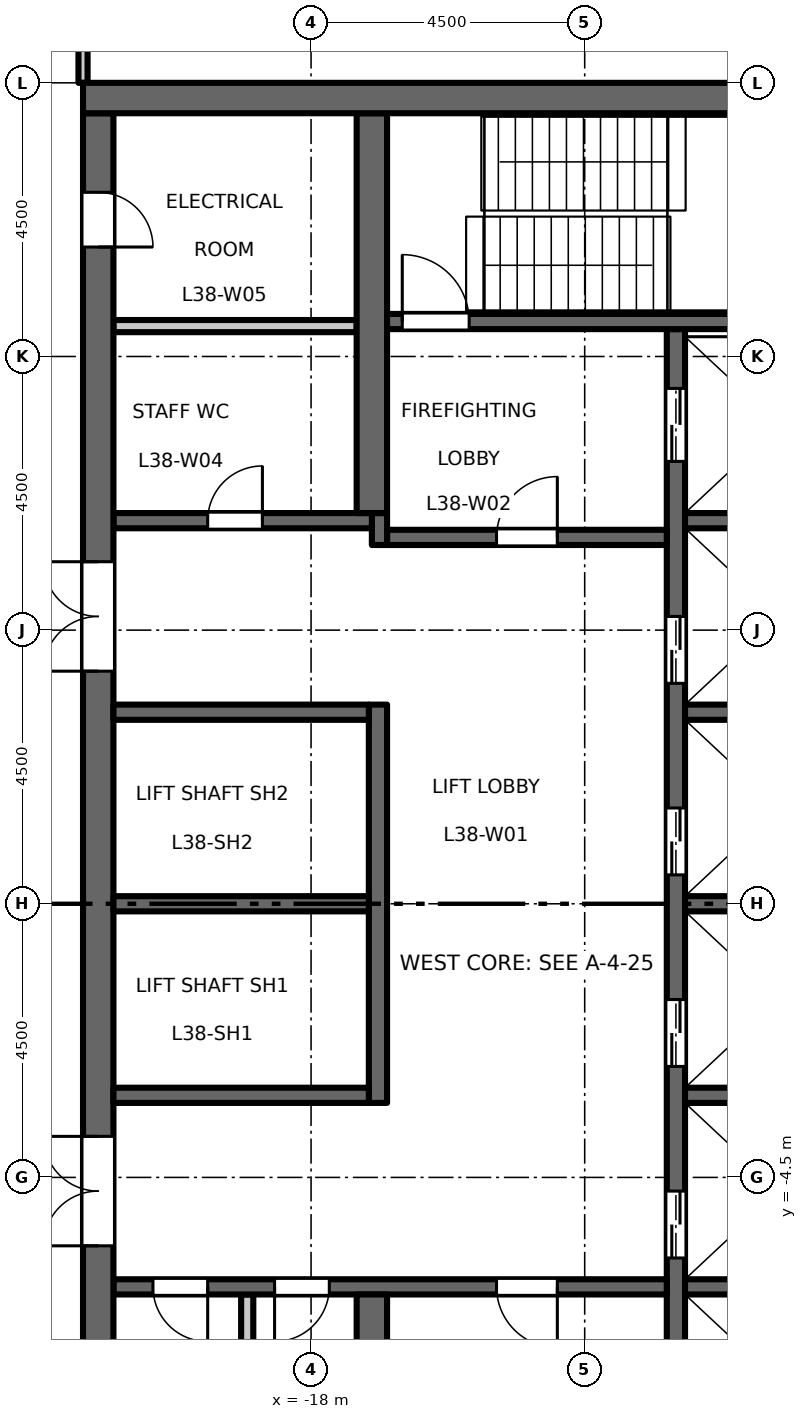
"""IFC4 building model, lengths in metres.
Left out: names, types, materials, properties, quantities, classifications, styles, units other than length and angle.
Written with IfcOpenShell. Run it as: python <this file> out.ifc"""

import sys

from ifc_helpers import new_model, si_unit, direction, frame, frame_2d, origin, place, context, subcontext, project, spatial, rectangle, extrude, element, fill, save


model = new_model("IFC4")
c1 = context("Model", 3, precision=1e-05, world=origin(), true_north=direction((0.0, 1.0)))
c2 = subcontext(c1, "Body", "Model", "MODEL_VIEW")
j1 = project(units=[si_unit("LENGTHUNIT", "METRE"), si_unit("PLANEANGLEUNIT", "RADIAN")], contexts=[c1])
p1 = place(None, origin())
s1 = spatial("IfcSite", under=j1, at=p1, CompositionType="ELEMENT")
p2 = place(p1, origin())
s2 = spatial("IfcBuilding", under=s1, at=p2, CompositionType="ELEMENT")
p3 = place(p2, frame((0.0, 0.0, 176.7)))
s3 = spatial("IfcBuildingStorey", under=s2, at=p3, CompositionType="ELEMENT", Elevation=176.7)
p4 = place(p3, frame((-12.0, -9.45, 0.0), z_axis=(0.0, 0.0, 1.0), x_axis=(0.0, 1.0, 0.0)))
e1 = element("IfcWall", 1, at=p4, inside=s3, PredefinedType="SHEAR", context=c2, shape_type="SweptSolid", body=[
    extrude(rectangle(XDim=18.9, YDim=0.3, at=frame_2d((9.45, 0.0))), origin(), (0.0, 0.0, 1.0), 4.3),
])
p5 = place(p4, frame((3.625, 0.0, 0.0)))
e2 = element("IfcOpeningElement", 2, at=p5, cuts=e1, PredefinedType="OPENING", context=c2, shape_type="SweptSolid", body=[
    extrude(rectangle(XDim=1.1, YDim=2.1, at=frame_2d((0.55, 1.05))), frame((0.0, 0.16, 0.0), z_axis=(0.0, -1.0, 0.0), x_axis=(1.0, 0.0, 0.0)), (0.0, 0.0, 1.0), 0.32),
])
p6 = place(p4, frame((6.775, 0.0, 0.0)))
e3 = element("IfcOpeningElement", 3, at=p6, cuts=e1, PredefinedType="OPENING", context=c2, shape_type="SweptSolid", body=[
    extrude(rectangle(XDim=1.1, YDim=2.1, at=frame_2d((0.55, 1.05))), frame((0.0, 0.16, 0.0), z_axis=(0.0, -1.0, 0.0), x_axis=(1.0, 0.0, 0.0)), (0.0, 0.0, 1.0), 0.32),
])
p7 = place(p4, frame((9.925, 0.0, 0.0)))
e4 = element("IfcOpeningElement", 4, at=p7, cuts=e1, PredefinedType="OPENING", context=c2, shape_type="SweptSolid", body=[
    extrude(rectangle(XDim=1.1, YDim=2.1, at=frame_2d((0.55, 1.05))), frame((0.0, 0.16, 0.0), z_axis=(0.0, -1.0, 0.0), x_axis=(1.0, 0.0, 0.0)), (0.0, 0.0, 1.0), 0.32),
])
p8 = place(p4, frame((13.075, 0.0, 0.0)))
e5 = element("IfcOpeningElement", 5, at=p8, cuts=e1, PredefinedType="OPENING", context=c2, shape_type="SweptSolid", body=[
    extrude(rectangle(XDim=1.1, YDim=2.1, at=frame_2d((0.55, 1.05))), frame((0.0, 0.16, 0.0), z_axis=(0.0, -1.0, 0.0), x_axis=(1.0, 0.0, 0.0)), (0.0, 0.0, 1.0), 0.32),
])
p9 = place(p4, frame((16.725, 0.0, 0.0)))
e6 = element("IfcOpeningElement", 6, at=p9, cuts=e1, PredefinedType="OPENING", context=c2, shape_type="SweptSolid", body=[
    extrude(rectangle(XDim=1.2, YDim=2.1, at=frame_2d((0.6, 1.05))), frame((0.0, 0.16, 0.0), z_axis=(0.0, -1.0, 0.0), x_axis=(1.0, 0.0, 0.0)), (0.0, 0.0, 1.0), 0.32),
])
p10 = place(p4, frame((0.975, 0.0, 0.0)))
e7 = element("IfcOpeningElement", 7, at=p10, cuts=e1, PredefinedType="OPENING", context=c2, shape_type="SweptSolid", body=[
    extrude(rectangle(XDim=1.2, YDim=2.1, at=frame_2d((0.6, 1.05))), frame((0.0, 0.16, 0.0), z_axis=(0.0, -1.0, 0.0), x_axis=(1.0, 0.0, 0.0)), (0.0, 0.0, 1.0), 0.32),
])
p11 = place(p3, frame((-12.15, 6.025, 0.0), z_axis=(0.0, 0.0, 1.0), x_axis=(-1.0, 0.0, 0.0)))
e8 = element("IfcWall", 8, at=p11, inside=s3, PredefinedType="SHEAR", context=c2, shape_type="SweptSolid", body=[
    extrude(rectangle(XDim=4.6, YDim=0.25, at=frame_2d((2.3, 0.0))), origin(), (0.0, 0.0, 1.0), 4.3),
])
p12 = place(p11, frame((1.8, 0.0, 0.0)))
e9 = element("IfcOpeningElement", 9, at=p12, cuts=e8, PredefinedType="OPENING", context=c2, shape_type="SweptSolid", body=[
    extrude(rectangle(XDim=1.0, YDim=2.1, at=frame_2d((0.5, 1.05))), frame((0.0, 0.135, 0.0), z_axis=(0.0, -1.0, 0.0), x_axis=(1.0, 0.0, 0.0)), (0.0, 0.0, 1.0), 0.27),
])
p13 = place(p3, frame((-16.875, 5.9, 0.0), z_axis=(0.0, 0.0, 1.0), x_axis=(0.0, 1.0, 0.0)))
e10 = element("IfcWall", 10, at=p13, inside=s3, PredefinedType="SHEAR", context=c2, shape_type="SweptSolid", body=[
    extrude(rectangle(XDim=0.525, YDim=0.25, at=frame_2d((0.263, 0.0))), origin(), (0.0, 0.0, 1.0), 4.3),
])
p14 = place(p3, frame((-17.0, 6.3, 0.0), z_axis=(0.0, 0.0, 1.0), x_axis=(-1.0, 0.0, 0.0)))
e11 = element("IfcWall", 11, at=p14, inside=s3, PredefinedType="SHEAR", context=c2, shape_type="SweptSolid", body=[
    extrude(rectangle(XDim=4.25, YDim=0.25, at=frame_2d((2.125, 0.0))), origin(), (0.0, 0.0, 1.0), 4.3),
])
p15 = place(p14, frame((1.8, 0.0, 0.0)))
e12 = element("IfcOpeningElement", 12, at=p15, cuts=e11, PredefinedType="OPENING", context=c2, shape_type="SweptSolid", body=[
    extrude(rectangle(XDim=0.9, YDim=2.1, at=frame_2d((0.45, 1.05))), frame((0.0, 0.135, 0.0), z_axis=(0.0, -1.0, 0.0), x_axis=(1.0, 0.0, 0.0)), (0.0, 0.0, 1.0), 0.27),
])
p16 = place(p3, frame((-12.15, -6.3, 0.0), z_axis=(0.0, 0.0, 1.0), x_axis=(-1.0, 0.0, 0.0)))
e13 = element("IfcWall", 13, at=p16, inside=s3, PredefinedType="SHEAR", context=c2, shape_type="SweptSolid", body=[
    extrude(rectangle(XDim=9.1, YDim=0.25, at=frame_2d((4.55, 0.0))), origin(), (0.0, 0.0, 1.0), 4.3),
])
p17 = place(p16, frame((1.8, 0.0, 0.0)))
e14 = element("IfcOpeningElement", 14, at=p17, cuts=e13, PredefinedType="OPENING", context=c2, shape_type="SweptSolid", body=[
    extrude(rectangle(XDim=1.0, YDim=2.1, at=frame_2d((0.5, 1.05))), frame((0.0, 0.135, 0.0), z_axis=(0.0, -1.0, 0.0), x_axis=(1.0, 0.0, 0.0)), (0.0, 0.0, 1.0), 0.27),
])
p18 = place(p16, frame((5.55, 0.0, 0.0)))
e15 = element("IfcOpeningElement", 15, at=p18, cuts=e13, PredefinedType="OPENING", context=c2, shape_type="SweptSolid", body=[
    extrude(rectangle(XDim=0.9, YDim=2.1, at=frame_2d((0.45, 1.05))), frame((0.0, 0.135, 0.0), z_axis=(0.0, -1.0, 0.0), x_axis=(1.0, 0.0, 0.0)), (0.0, 0.0, 1.0), 0.27),
])
p19 = place(p16, frame((7.55, 0.0, 0.0)))
e16 = element("IfcOpeningElement", 16, at=p19, cuts=e13, PredefinedType="OPENING", context=c2, shape_type="SweptSolid", body=[
    extrude(rectangle(XDim=0.9, YDim=2.1, at=frame_2d((0.45, 1.05))), frame((0.0, 0.135, 0.0), z_axis=(0.0, -1.0, 0.0), x_axis=(1.0, 0.0, 0.0)), (0.0, 0.0, 1.0), 0.27),
])
p20 = place(p3, frame((-21.5, -13.0, 0.0), z_axis=(0.0, 0.0, 1.0), x_axis=(0.0, 1.0, 0.0)))
e17 = element("IfcWall", 17, at=p20, inside=s3, PredefinedType="SHEAR", context=c2, shape_type="SweptSolid", body=[
    extrude(rectangle(XDim=26.0, YDim=0.5, at=frame_2d((13.0, 0.0))), origin(), (0.0, 0.0, 1.0), 4.3),
])
p21 = place(p20, frame((16.825, 0.0, 0.0)))
e18 = element("IfcOpeningElement", 18, at=p21, cuts=e17, PredefinedType="OPENING", context=c2, shape_type="SweptSolid", body=[
    extrude(rectangle(XDim=1.8, YDim=2.1, at=frame_2d((0.9, 1.05))), frame((0.0, 0.26, 0.0), z_axis=(0.0, -1.0, 0.0), x_axis=(1.0, 0.0, 0.0)), (0.0, 0.0, 1.0), 0.52),
])
p22 = place(p20, frame((7.375, 0.0, 0.0)))
e19 = element("IfcOpeningElement", 19, at=p22, cuts=e17, PredefinedType="OPENING", context=c2, shape_type="SweptSolid", body=[
    extrude(rectangle(XDim=1.8, YDim=2.1, at=frame_2d((0.9, 1.05))), frame((0.0, 0.26, 0.0), z_axis=(0.0, -1.0, 0.0), x_axis=(1.0, 0.0, 0.0)), (0.0, 0.0, 1.0), 0.52),
])
p23 = place(p20, frame((23.8, 0.0, 0.0)))
e20 = element("IfcOpeningElement", 20, at=p23, cuts=e17, PredefinedType="OPENING", context=c2, shape_type="SweptSolid", body=[
    extrude(rectangle(XDim=0.9, YDim=2.1, at=frame_2d((0.45, 1.05))), frame((0.0, 0.26, 0.0), z_axis=(0.0, -1.0, 0.0), x_axis=(1.0, 0.0, 0.0)), (0.0, 0.0, 1.0), 0.52),
])
p24 = place(p3, frame((-17.25, 9.5, 0.0), z_axis=(0.0, 0.0, 1.0), x_axis=(-1.0, 0.0, 0.0)))
e21 = element("IfcWall", 21, at=p24, inside=s3, PredefinedType="PARTITIONING", context=c2, shape_type="SweptSolid", body=[
    extrude(rectangle(XDim=4.0, YDim=0.2, at=frame_2d((2.0, 0.0))), origin(), (0.0, 0.0, 1.0), 4.3),
])
p25 = place(p3, frame((-19.05, -13.0, 0.0), z_axis=(0.0, 0.0, 1.0), x_axis=(0.0, 1.0, 0.0)))
e22 = element("IfcWall", 22, at=p25, inside=s3, PredefinedType="PARTITIONING", context=c2, shape_type="SweptSolid", body=[
    extrude(rectangle(XDim=6.575, YDim=0.2, at=frame_2d((3.288, 0.0))), origin(), (0.0, 0.0, 1.0), 4.3),
])
p26 = place(p3, frame((-16.9, -3.275, 0.0), z_axis=(0.0, 0.0, 1.0), x_axis=(0.0, 1.0, 0.0)))
e23 = element("IfcWall", 23, at=p26, inside=s3, PredefinedType="SHEAR", context=c2, shape_type="SweptSolid", body=[
    extrude(rectangle(XDim=6.55, YDim=0.3, at=frame_2d((3.275, 0.0))), origin(), (0.0, 0.0, 1.0), 4.3),
])
for number, where, z_axis, x_axis in (
    (24, (-17.05, 0.0, 0.0), (0.0, 0.0, 1.0), (-1.0, 0.0, 0.0)),
    (25, (-17.05, 3.15, 0.0), (0.0, 0.0, 1.0), (-1.0, 0.0, 0.0)),
    (26, (-17.05, -3.15, 0.0), (0.0, 0.0, 1.0), (-1.0, 0.0, 0.0)),
):
    element("IfcWall", number, at=place(p3, frame(where, z_axis=z_axis, x_axis=x_axis)), inside=s3, PredefinedType="SHEAR", context=c2, shape_type="SweptSolid", body=[
        extrude(rectangle(XDim=4.2, YDim=0.25, at=frame_2d((2.1, 0.0))), origin(), (0.0, 0.0, 1.0), 4.3),
    ])
for number, where, z_axis, x_axis in (
    (27, (-17.0, 6.425, 0.0), (0.0, 0.0, 1.0), (0.0, 1.0, 0.0)),
    (28, (-17.0, -13.0, 0.0), (0.0, 0.0, 1.0), (0.0, 1.0, 0.0)),
):
    element("IfcWall", number, at=place(p3, frame(where, z_axis=z_axis, x_axis=x_axis)), inside=s3, PredefinedType="SHEAR", context=c2, shape_type="SweptSolid", body=[
        extrude(rectangle(XDim=6.575, YDim=0.5, at=frame_2d((3.288, 0.0))), origin(), (0.0, 0.0, 1.0), 4.3),
    ])
for number, where, z_axis, x_axis in (
    (29, (-8.75, 0.0, 0.0), (0.0, 0.0, 1.0), (-1.0, 0.0, 0.0)),
    (30, (-8.75, 3.15, 0.0), (0.0, 0.0, 1.0), (-1.0, 0.0, 0.0)),
    (31, (-8.75, 6.3, 0.0), (0.0, 0.0, 1.0), (-1.0, 0.0, 0.0)),
    (32, (-8.75, -3.15, 0.0), (0.0, 0.0, 1.0), (-1.0, 0.0, 0.0)),
    (33, (-8.75, -6.3, 0.0), (0.0, 0.0, 1.0), (-1.0, 0.0, 0.0)),
):
    element("IfcWall", number, at=place(p3, frame(where, z_axis=z_axis, x_axis=x_axis)), inside=s3, PredefinedType="SHEAR", context=c2, shape_type="SweptSolid", body=[
        extrude(rectangle(XDim=3.1, YDim=0.25, at=frame_2d((1.55, 0.0))), origin(), (0.0, 0.0, 1.0), 4.3),
    ])
p27 = place(p3, frame((-8.75, 9.575, 0.0), z_axis=(0.0, 0.0, 1.0), x_axis=(-1.0, 0.0, 0.0)))
e34 = element("IfcWall", 34, at=p27, inside=s3, PredefinedType="SHEAR", context=c2, shape_type="SweptSolid", body=[
    extrude(rectangle(XDim=8.0, YDim=0.25, at=frame_2d((4.0, 0.0))), origin(), (0.0, 0.0, 1.0), 4.3),
])
p28 = place(p27, frame((6.65, 0.0, 0.0)))
e35 = element("IfcOpeningElement", 35, at=p28, cuts=e34, PredefinedType="OPENING", context=c2, shape_type="SweptSolid", body=[
    extrude(rectangle(XDim=1.1, YDim=2.1, at=frame_2d((0.55, 1.05))), frame((0.0, 0.135, 0.0), z_axis=(0.0, -1.0, 0.0), x_axis=(1.0, 0.0, 0.0)), (0.0, 0.0, 1.0), 0.27),
])
p29 = place(p3, frame((-8.25, 13.25, 0.0), z_axis=(0.0, 0.0, 1.0), x_axis=(-1.0, 0.0, 0.0)))
e36 = element("IfcWall", 36, at=p29, inside=s3, PredefinedType="SHEAR", context=c2, shape_type="SweptSolid", body=[
    extrude(rectangle(XDim=13.5, YDim=0.5, at=frame_2d((6.75, 0.0))), origin(), (0.0, 0.0, 1.0), 4.3),
])
p30 = place(p3, frame((-21.75, 13.5, 0.0), z_axis=(0.0, 0.0, 1.0), x_axis=(0.0, 1.0, 0.0)))
e37 = element("IfcWall", 37, at=p30, inside=s3, PredefinedType="PARTITIONING", context=c2, shape_type="SweptSolid", body=[
    extrude(rectangle(XDim=5.425, YDim=0.15, at=frame_2d((2.712, 0.0))), origin(), (0.0, 0.0, 1.0), 4.3),
])
p31 = place(p12, origin())
e38 = element("IfcDoor", 38, at=p31, inside=s3, OperationType="SINGLE_SWING_LEFT", PredefinedType="DOOR", context=c2, shape_type="SweptSolid", body=[
    extrude(rectangle(XDim=1.0, YDim=2.1, at=frame_2d((0.5, 1.05))), frame((0.0, 0.025, 0.0), z_axis=(0.0, -1.0, 0.0), x_axis=(1.0, 0.0, 0.0)), (0.0, 0.0, 1.0), 0.05),
])
fill(e9, e38)
p32 = place(p17, origin())
e39 = element("IfcDoor", 39, at=p32, inside=s3, OperationType="SINGLE_SWING_RIGHT", PredefinedType="DOOR", context=c2, shape_type="SweptSolid", body=[
    extrude(rectangle(XDim=1.0, YDim=2.1, at=frame_2d((0.5, 1.05))), frame((0.0, 0.025, 0.0), z_axis=(0.0, -1.0, 0.0), x_axis=(1.0, 0.0, 0.0)), (0.0, 0.0, 1.0), 0.05),
])
fill(e14, e39)
p33 = place(p28, origin())
e40 = element("IfcDoor", 40, at=p33, inside=s3, OperationType="SINGLE_SWING_RIGHT", PredefinedType="DOOR", context=c2, shape_type="SweptSolid", body=[
    extrude(rectangle(XDim=1.1, YDim=2.1, at=frame_2d((0.55, 1.05))), frame((0.0, 0.025, 0.0), z_axis=(0.0, -1.0, 0.0), x_axis=(1.0, 0.0, 0.0)), (0.0, 0.0, 1.0), 0.05),
])
fill(e35, e40)
p34 = place(p21, origin())
e41 = element("IfcDoor", 41, at=p34, inside=s3, OperationType="DOUBLE_DOOR_DOUBLE_SWING", PredefinedType="DOOR", context=c2, shape_type="SweptSolid", body=[
    extrude(rectangle(XDim=1.8, YDim=2.1, at=frame_2d((0.9, 1.05))), frame((0.0, 0.025, 0.0), z_axis=(0.0, -1.0, 0.0), x_axis=(1.0, 0.0, 0.0)), (0.0, 0.0, 1.0), 0.05),
])
fill(e18, e41)
p35 = place(p22, origin())
e42 = element("IfcDoor", 42, at=p35, inside=s3, OperationType="DOUBLE_DOOR_DOUBLE_SWING", PredefinedType="DOOR", context=c2, shape_type="SweptSolid", body=[
    extrude(rectangle(XDim=1.8, YDim=2.1, at=frame_2d((0.9, 1.05))), frame((0.0, 0.025, 0.0), z_axis=(0.0, -1.0, 0.0), x_axis=(1.0, 0.0, 0.0)), (0.0, 0.0, 1.0), 0.05),
])
fill(e19, e42)
p36 = place(p5, origin())
e43 = element("IfcDoor", 43, at=p36, inside=s3, OperationType="DOUBLE_DOOR_SLIDING", PredefinedType="DOOR", context=c2, shape_type="SweptSolid", body=[
    extrude(rectangle(XDim=1.1, YDim=2.1, at=frame_2d((0.55, 1.05))), frame((0.0, 0.025, 0.0), z_axis=(0.0, -1.0, 0.0), x_axis=(1.0, 0.0, 0.0)), (0.0, 0.0, 1.0), 0.05),
])
fill(e2, e43)
p37 = place(p6, origin())
e44 = element("IfcDoor", 44, at=p37, inside=s3, OperationType="DOUBLE_DOOR_SLIDING", PredefinedType="DOOR", context=c2, shape_type="SweptSolid", body=[
    extrude(rectangle(XDim=1.1, YDim=2.1, at=frame_2d((0.55, 1.05))), frame((0.0, 0.025, 0.0), z_axis=(0.0, -1.0, 0.0), x_axis=(1.0, 0.0, 0.0)), (0.0, 0.0, 1.0), 0.05),
])
fill(e3, e44)
p38 = place(p7, origin())
e45 = element("IfcDoor", 45, at=p38, inside=s3, OperationType="DOUBLE_DOOR_SLIDING", PredefinedType="DOOR", context=c2, shape_type="SweptSolid", body=[
    extrude(rectangle(XDim=1.1, YDim=2.1, at=frame_2d((0.55, 1.05))), frame((0.0, 0.025, 0.0), z_axis=(0.0, -1.0, 0.0), x_axis=(1.0, 0.0, 0.0)), (0.0, 0.0, 1.0), 0.05),
])
fill(e4, e45)
p39 = place(p8, origin())
e46 = element("IfcDoor", 46, at=p39, inside=s3, OperationType="DOUBLE_DOOR_SLIDING", PredefinedType="DOOR", context=c2, shape_type="SweptSolid", body=[
    extrude(rectangle(XDim=1.1, YDim=2.1, at=frame_2d((0.55, 1.05))), frame((0.0, 0.025, 0.0), z_axis=(0.0, -1.0, 0.0), x_axis=(1.0, 0.0, 0.0)), (0.0, 0.0, 1.0), 0.05),
])
fill(e5, e46)
p40 = place(p9, origin())
e47 = element("IfcDoor", 47, at=p40, inside=s3, OperationType="DOUBLE_DOOR_SLIDING", PredefinedType="DOOR", context=c2, shape_type="SweptSolid", body=[
    extrude(rectangle(XDim=1.2, YDim=2.1, at=frame_2d((0.6, 1.05))), frame((0.0, 0.025, 0.0), z_axis=(0.0, -1.0, 0.0), x_axis=(1.0, 0.0, 0.0)), (0.0, 0.0, 1.0), 0.05),
])
fill(e6, e47)
p41 = place(p15, origin())
e48 = element("IfcDoor", 48, at=p41, inside=s3, OperationType="SINGLE_SWING_LEFT", PredefinedType="DOOR", context=c2, shape_type="SweptSolid", body=[
    extrude(rectangle(XDim=0.9, YDim=2.1, at=frame_2d((0.45, 1.05))), frame((0.0, 0.025, 0.0), z_axis=(0.0, -1.0, 0.0), x_axis=(1.0, 0.0, 0.0)), (0.0, 0.0, 1.0), 0.05),
])
fill(e12, e48)
p42 = place(p23, origin())
e49 = element("IfcDoor", 49, at=p42, inside=s3, OperationType="SINGLE_SWING_LEFT", PredefinedType="DOOR", context=c2, shape_type="SweptSolid", body=[
    extrude(rectangle(XDim=0.9, YDim=2.1, at=frame_2d((0.45, 1.05))), frame((0.0, 0.025, 0.0), z_axis=(0.0, -1.0, 0.0), x_axis=(1.0, 0.0, 0.0)), (0.0, 0.0, 1.0), 0.05),
])
fill(e20, e49)
p43 = place(p18, origin())
e50 = element("IfcDoor", 50, at=p43, inside=s3, OperationType="SINGLE_SWING_LEFT", PredefinedType="DOOR", context=c2, shape_type="SweptSolid", body=[
    extrude(rectangle(XDim=0.9, YDim=2.1, at=frame_2d((0.45, 1.05))), frame((0.0, 0.025, 0.0), z_axis=(0.0, -1.0, 0.0), x_axis=(1.0, 0.0, 0.0)), (0.0, 0.0, 1.0), 0.05),
])
fill(e15, e50)
p44 = place(p19, origin())
e51 = element("IfcDoor", 51, at=p44, inside=s3, OperationType="SINGLE_SWING_RIGHT", PredefinedType="DOOR", context=c2, shape_type="SweptSolid", body=[
    extrude(rectangle(XDim=0.9, YDim=2.1, at=frame_2d((0.45, 1.05))), frame((0.0, 0.025, 0.0), z_axis=(0.0, -1.0, 0.0), x_axis=(1.0, 0.0, 0.0)), (0.0, 0.0, 1.0), 0.05),
])
fill(e16, e51)
save(model, sys.argv[1])
